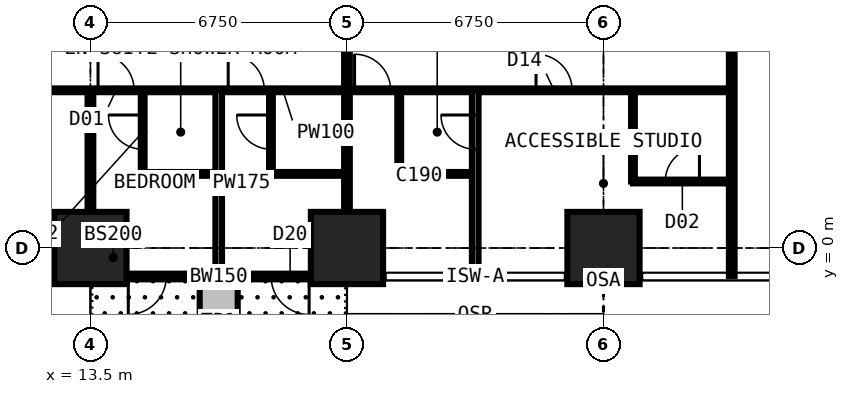
"""IFC4 building model, lengths in metres.
Left out: names, types, materials, properties, quantities, classifications, styles, units other than length and angle.
Written with IfcOpenShell. Run it as: python <this file> out.ifc"""

import sys

from ifc_helpers import new_model, si_unit, direction, frame, frame_2d, origin, origin_2d, place, context, subcontext, project, spatial, rectangle, extrude, element, fill, save


model = new_model("IFC4")
c1 = context("Model", 3, precision=1e-05, world=origin(), true_north=direction((0.0, 1.0)))
c2 = subcontext(c1, "Body", "Model", "MODEL_VIEW")
j1 = project(units=[si_unit("LENGTHUNIT", "METRE"), si_unit("PLANEANGLEUNIT", "RADIAN")], contexts=[c1])
p1 = place(None, origin())
s1 = spatial("IfcSite", under=j1, at=p1, CompositionType="ELEMENT")
p2 = place(p1, origin())
s2 = spatial("IfcBuilding", under=s1, at=p2, CompositionType="ELEMENT")
p3 = place(p2, frame((0.0, 0.0, 32.4)))
s3 = spatial("IfcBuildingStorey", under=s2, at=p3, CompositionType="ELEMENT", Elevation=32.4)
for number, where, z_axis, x_axis in (
    (1, (13.5, 0.0, 0.0), (0.0, 0.0, 1.0), (1.0, 0.0, 0.0)),
    (2, (20.25, 0.0, 0.0), (0.0, 0.0, 1.0), (1.0, 0.0, 0.0)),
    (3, (27.0, 0.0, 0.0), (0.0, 0.0, 1.0), (1.0, 0.0, 0.0)),
):
    element("IfcColumn", number, at=place(p3, frame(where, z_axis=z_axis, x_axis=x_axis)), inside=s3, PredefinedType="COLUMN", context=c2, shape_type="SweptSolid", body=[
        extrude(rectangle(XDim=1.9, YDim=1.9, at=origin_2d()), origin(), (0.0, 0.0, 1.0), 3.6),
    ])
p4 = place(p3, frame((20.25, -0.75, 0.0), z_axis=(0.0, 0.0, 1.0), x_axis=(-1.0, 0.0, 0.0)))
e4 = element("IfcWall", 4, at=p4, inside=s3, PredefinedType="SOLIDWALL", context=c2, shape_type="SweptSolid", body=[
    extrude(rectangle(XDim=6.75, YDim=0.15, at=frame_2d((3.375, 0.0))), origin(), (0.0, 0.0, 1.0), 3.375),
])
p5 = place(p4, frame((0.996, 0.0, 0.0)))
e5 = element("IfcOpeningElement", 5, at=p5, cuts=e4, PredefinedType="OPENING", context=c2, shape_type="SweptSolid", body=[
    extrude(rectangle(XDim=1.0, YDim=2.2, at=frame_2d((0.5, 1.1))), frame((0.0, 0.085, 0.0), z_axis=(0.0, -1.0, 0.0), x_axis=(1.0, 0.0, 0.0)), (0.0, 0.0, 1.0), 0.17),
])
p6 = place(p4, frame((2.042, 0.0, 0.9)))
e6 = element("IfcOpeningElement", 6, at=p6, cuts=e4, PredefinedType="OPENING", context=c2, shape_type="SweptSolid", body=[
    extrude(rectangle(XDim=1.2, YDim=1.8, at=frame_2d((0.6, 0.9))), frame((0.0, 0.085, 0.0), z_axis=(0.0, -1.0, 0.0), x_axis=(1.0, 0.0, 0.0)), (0.0, 0.0, 1.0), 0.17),
])
p7 = place(p4, frame((4.754, 0.0, 0.0)))
e7 = element("IfcOpeningElement", 7, at=p7, cuts=e4, PredefinedType="OPENING", context=c2, shape_type="SweptSolid", body=[
    extrude(rectangle(XDim=1.0, YDim=2.2, at=frame_2d((0.5, 1.1))), frame((0.0, 0.085, 0.0), z_axis=(0.0, -1.0, 0.0), x_axis=(1.0, 0.0, 0.0)), (0.0, 0.0, 1.0), 0.17),
])
p8 = place(p4, frame((3.508, 0.0, 0.9)))
e8 = element("IfcOpeningElement", 8, at=p8, cuts=e4, PredefinedType="OPENING", context=c2, shape_type="SweptSolid", body=[
    extrude(rectangle(XDim=1.2, YDim=1.8, at=frame_2d((0.6, 0.9))), frame((0.0, 0.085, 0.0), z_axis=(0.0, -1.0, 0.0), x_axis=(1.0, 0.0, 0.0)), (0.0, 0.0, 1.0), 0.17),
])
p9 = place(p3, frame((16.875, -0.85, 0.0), z_axis=(0.0, 0.0, 1.0), x_axis=(0.0, -1.0, 0.0)))
e9 = element("IfcWall", 9, at=p9, inside=s3, PredefinedType="USERDEFINED", context=c2, shape_type="SweptSolid", body=[
    extrude(rectangle(XDim=2.2, YDim=1.0, at=frame_2d((1.1, 0.0))), origin(), (0.0, 0.0, 1.0), 0.9),
])
p10 = place(p3, frame((6.75, 4.15, 0.0), z_axis=(0.0, 0.0, 1.0), x_axis=(1.0, 0.0, 0.0)))
e10 = element("IfcWall", 10, at=p10, inside=s3, PredefinedType="PARTITIONING", context=c2, shape_type="SweptSolid", body=[
    extrude(rectangle(XDim=23.625, YDim=0.1, at=frame_2d((11.812, 0.0))), origin(), (0.0, 0.0, 1.0), 3.375),
])
p11 = place(p10, frame((2.85, 0.0, 0.0)))
e11 = element("IfcOpeningElement", 11, at=p11, cuts=e10, PredefinedType="OPENING", context=c2, shape_type="SweptSolid", body=[
    extrude(rectangle(XDim=1.0, YDim=2.2, at=frame_2d((0.5, 1.1))), frame((0.0, 0.06, 0.0), z_axis=(0.0, -1.0, 0.0), x_axis=(1.0, 0.0, 0.0)), (0.0, 0.0, 1.0), 0.12),
])
p12 = place(p10, frame((6.95, 0.0, 0.0)))
e12 = element("IfcOpeningElement", 12, at=p12, cuts=e10, PredefinedType="OPENING", context=c2, shape_type="SweptSolid", body=[
    extrude(rectangle(XDim=0.95, YDim=2.2, at=frame_2d((0.475, 1.1))), frame((0.0, 0.06, 0.0), z_axis=(0.0, -1.0, 0.0), x_axis=(1.0, 0.0, 0.0)), (0.0, 0.0, 1.0), 0.12),
])
p13 = place(p10, frame((10.375, 0.0, 0.0)))
e13 = element("IfcOpeningElement", 13, at=p13, cuts=e10, PredefinedType="OPENING", context=c2, shape_type="SweptSolid", body=[
    extrude(rectangle(XDim=0.95, YDim=2.2, at=frame_2d((0.475, 1.1))), frame((0.0, 0.06, 0.0), z_axis=(0.0, -1.0, 0.0), x_axis=(1.0, 0.0, 0.0)), (0.0, 0.0, 1.0), 0.12),
])
p14 = place(p10, frame((18.475, 0.0, 0.0)))
e14 = element("IfcOpeningElement", 14, at=p14, cuts=e10, PredefinedType="OPENING", context=c2, shape_type="SweptSolid", body=[
    extrude(rectangle(XDim=0.95, YDim=2.2, at=frame_2d((0.475, 1.1))), frame((0.0, 0.06, 0.0), z_axis=(0.0, -1.0, 0.0), x_axis=(1.0, 0.0, 0.0)), (0.0, 0.0, 1.0), 0.12),
])
p15 = place(p10, frame((13.7, 0.0, 0.0)))
e15 = element("IfcOpeningElement", 15, at=p15, cuts=e10, PredefinedType="OPENING", context=c2, shape_type="SweptSolid", body=[
    extrude(rectangle(XDim=0.95, YDim=2.2, at=frame_2d((0.475, 1.1))), frame((0.0, 0.06, 0.0), z_axis=(0.0, -1.0, 0.0), x_axis=(1.0, 0.0, 0.0)), (0.0, 0.0, 1.0), 0.12),
])
p16 = place(p3, frame((13.5, -0.734, 0.0), z_axis=(0.0, 0.0, 1.0), x_axis=(0.0, 1.0, 0.0)))
e16 = element("IfcWall", 16, at=p16, inside=s3, PredefinedType="PARTITIONING", context=c2, shape_type="SweptSolid", body=[
    extrude(rectangle(XDim=4.884, YDim=0.15, at=frame_2d((2.442, 0.0))), origin(), (0.0, 0.0, 1.0), 2.877),
])
p17 = place(p3, frame((14.875, 1.95, 0.0), z_axis=(0.0, 0.0, 1.0), x_axis=(0.0, 1.0, 0.0)))
e17 = element("IfcWall", 17, at=p17, inside=s3, PredefinedType="PARTITIONING", context=c2, shape_type="SweptSolid", body=[
    extrude(rectangle(XDim=2.2, YDim=0.1, at=frame_2d((1.1, 0.0))), origin(), (0.0, 0.0, 1.0), 3.375),
])
p18 = place(p17, frame((0.65, 0.0, 0.0)))
e18 = element("IfcOpeningElement", 18, at=p18, cuts=e17, PredefinedType="OPENING", context=c2, shape_type="SweptSolid", body=[
    extrude(rectangle(XDim=0.9, YDim=2.2, at=frame_2d((0.45, 1.1))), frame((0.0, 0.06, 0.0), z_axis=(0.0, -1.0, 0.0), x_axis=(1.0, 0.0, 0.0)), (0.0, 0.0, 1.0), 0.12),
])
p19 = place(p3, frame((14.875, 1.95, 0.0), z_axis=(0.0, 0.0, 1.0), x_axis=(1.0, 0.0, 0.0)))
e19 = element("IfcWall", 19, at=p19, inside=s3, PredefinedType="PARTITIONING", context=c2, shape_type="SweptSolid", body=[
    extrude(rectangle(XDim=2.0, YDim=0.1, at=frame_2d((1.0, 0.0))), origin(), (0.0, 0.0, 1.0), 3.375),
])
p20 = place(p3, frame((16.875, -0.734, 0.0), z_axis=(0.0, 0.0, 1.0), x_axis=(0.0, 1.0, 0.0)))
e20 = element("IfcWall", 20, at=p20, inside=s3, PredefinedType="PARTITIONING", context=c2, shape_type="SweptSolid", body=[
    extrude(rectangle(XDim=4.884, YDim=0.175, at=frame_2d((2.442, 0.0))), origin(), (0.0, 0.0, 1.0), 3.375),
])
p21 = place(p3, frame((18.25, 1.95, 0.0), z_axis=(0.0, 0.0, 1.0), x_axis=(0.0, 1.0, 0.0)))
e21 = element("IfcWall", 21, at=p21, inside=s3, PredefinedType="PARTITIONING", context=c2, shape_type="SweptSolid", body=[
    extrude(rectangle(XDim=2.2, YDim=0.1, at=frame_2d((1.1, 0.0))), origin(), (0.0, 0.0, 1.0), 3.375),
])
p22 = place(p21, frame((0.65, 0.0, 0.0)))
e22 = element("IfcOpeningElement", 22, at=p22, cuts=e21, PredefinedType="OPENING", context=c2, shape_type="SweptSolid", body=[
    extrude(rectangle(XDim=0.9, YDim=2.2, at=frame_2d((0.45, 1.1))), frame((0.0, 0.06, 0.0), z_axis=(0.0, -1.0, 0.0), x_axis=(1.0, 0.0, 0.0)), (0.0, 0.0, 1.0), 0.12),
])
p23 = place(p3, frame((18.25, 1.95, 0.0), z_axis=(0.0, 0.0, 1.0), x_axis=(1.0, 0.0, 0.0)))
e23 = element("IfcWall", 23, at=p23, inside=s3, PredefinedType="PARTITIONING", context=c2, shape_type="SweptSolid", body=[
    extrude(rectangle(XDim=2.0, YDim=0.1, at=frame_2d((1.0, 0.0))), origin(), (0.0, 0.0, 1.0), 3.375),
])
p24 = place(p3, frame((20.25, -0.734, 0.0), z_axis=(0.0, 0.0, 1.0), x_axis=(0.0, 1.0, 0.0)))
e24 = element("IfcWall", 24, at=p24, inside=s3, PredefinedType="PARTITIONING", context=c2, shape_type="SweptSolid", body=[
    extrude(rectangle(XDim=12.034, YDim=0.15, at=frame_2d((6.017, 0.0))), origin(), (0.0, 0.0, 1.0), 2.61),
])
p25 = place(p3, frame((21.625, 1.95, 0.0), z_axis=(0.0, 0.0, 1.0), x_axis=(0.0, 1.0, 0.0)))
e25 = element("IfcWall", 25, at=p25, inside=s3, PredefinedType="PARTITIONING", context=c2, shape_type="SweptSolid", body=[
    extrude(rectangle(XDim=2.2, YDim=0.1, at=frame_2d((1.1, 0.0))), origin(), (0.0, 0.0, 1.0), 3.375),
])
p26 = place(p3, frame((21.625, 1.95, 0.0), z_axis=(0.0, 0.0, 1.0), x_axis=(1.0, 0.0, 0.0)))
e26 = element("IfcWall", 26, at=p26, inside=s3, PredefinedType="PARTITIONING", context=c2, shape_type="SweptSolid", body=[
    extrude(rectangle(XDim=2.0, YDim=0.1, at=frame_2d((1.0, 0.0))), origin(), (0.0, 0.0, 1.0), 3.375),
])
p27 = place(p3, frame((23.625, -0.734, 0.0), z_axis=(0.0, 0.0, 1.0), x_axis=(0.0, 1.0, 0.0)))
e27 = element("IfcWall", 27, at=p27, inside=s3, PredefinedType="PARTITIONING", context=c2, shape_type="SweptSolid", body=[
    extrude(rectangle(XDim=4.884, YDim=0.175, at=frame_2d((2.442, 0.0))), origin(), (0.0, 0.0, 1.0), 3.375),
])
p28 = place(p27, frame((3.334, 0.0, 0.0)))
e28 = element("IfcOpeningElement", 28, at=p28, cuts=e27, PredefinedType="OPENING", context=c2, shape_type="SweptSolid", body=[
    extrude(rectangle(XDim=0.9, YDim=2.2, at=frame_2d((0.45, 1.1))), frame((0.0, 0.097, 0.0), z_axis=(0.0, -1.0, 0.0), x_axis=(1.0, 0.0, 0.0)), (0.0, 0.0, 1.0), 0.195),
])
p29 = place(p3, frame((27.775, 1.75, 0.0), z_axis=(0.0, 0.0, 1.0), x_axis=(0.0, 1.0, 0.0)))
e29 = element("IfcWall", 29, at=p29, inside=s3, PredefinedType="PARTITIONING", context=c2, shape_type="SweptSolid", body=[
    extrude(rectangle(XDim=2.4, YDim=0.1, at=frame_2d((1.2, 0.0))), origin(), (0.0, 0.0, 1.0), 3.375),
])
p30 = place(p3, frame((27.775, 1.75, 0.0), z_axis=(0.0, 0.0, 1.0), x_axis=(1.0, 0.0, 0.0)))
e30 = element("IfcWall", 30, at=p30, inside=s3, PredefinedType="PARTITIONING", context=c2, shape_type="SweptSolid", body=[
    extrude(rectangle(XDim=2.6, YDim=0.1, at=frame_2d((1.3, 0.0))), origin(), (0.0, 0.0, 1.0), 3.375),
])
p31 = place(p30, frame((0.85, 0.0, 0.0)))
e31 = element("IfcOpeningElement", 31, at=p31, cuts=e30, PredefinedType="OPENING", context=c2, shape_type="SweptSolid", body=[
    extrude(rectangle(XDim=0.9, YDim=2.2, at=frame_2d((0.45, 1.1))), frame((0.0, 0.06, 0.0), z_axis=(0.0, -1.0, 0.0), x_axis=(1.0, 0.0, 0.0)), (0.0, 0.0, 1.0), 0.12),
])
p32 = place(p3, frame((30.375, -0.734, 0.0), z_axis=(0.0, 0.0, 1.0), x_axis=(0.0, 1.0, 0.0)))
e32 = element("IfcWall", 32, at=p32, inside=s3, PredefinedType="PARTITIONING", context=c2, shape_type="SweptSolid", body=[
    extrude(rectangle(XDim=12.034, YDim=0.15, at=frame_2d((6.017, 0.0))), origin(), (0.0, 0.0, 1.0), 3.375),
])
p33 = place(p5, origin())
e33 = element("IfcDoor", 33, at=p33, inside=s3, OperationType="SINGLE_SWING_LEFT", PredefinedType="DOOR", context=c2, shape_type="SweptSolid", body=[
    extrude(rectangle(XDim=1.0, YDim=2.2, at=frame_2d((0.5, 1.1))), frame((0.0, 0.025, 0.0), z_axis=(0.0, -1.0, 0.0), x_axis=(1.0, 0.0, 0.0)), (0.0, 0.0, 1.0), 0.05),
])
fill(e5, e33)
p34 = place(p6, origin())
e34 = element("IfcWindow", 34, at=p34, inside=s3, PartitioningType="SINGLE_PANEL", PredefinedType="WINDOW", context=c2, shape_type="SweptSolid", body=[
    extrude(rectangle(XDim=1.2, YDim=1.8, at=frame_2d((0.6, 0.9))), frame((0.0, 0.03, 0.0), z_axis=(0.0, -1.0, 0.0), x_axis=(1.0, 0.0, 0.0)), (0.0, 0.0, 1.0), 0.06),
])
fill(e6, e34)
p35 = place(p7, origin())
e35 = element("IfcDoor", 35, at=p35, inside=s3, OperationType="SINGLE_SWING_RIGHT", PredefinedType="DOOR", context=c2, shape_type="SweptSolid", body=[
    extrude(rectangle(XDim=1.0, YDim=2.2, at=frame_2d((0.5, 1.1))), frame((0.0, 0.025, 0.0), z_axis=(0.0, -1.0, 0.0), x_axis=(1.0, 0.0, 0.0)), (0.0, 0.0, 1.0), 0.05),
])
fill(e7, e35)
p36 = place(p8, origin())
e36 = element("IfcWindow", 36, at=p36, inside=s3, PartitioningType="SINGLE_PANEL", PredefinedType="WINDOW", context=c2, shape_type="SweptSolid", body=[
    extrude(rectangle(XDim=1.2, YDim=1.8, at=frame_2d((0.6, 0.9))), frame((0.0, 0.03, 0.0), z_axis=(0.0, -1.0, 0.0), x_axis=(1.0, 0.0, 0.0)), (0.0, 0.0, 1.0), 0.06),
])
fill(e8, e36)
p37 = place(p12, origin())
e37 = element("IfcDoor", 37, at=p37, inside=s3, OperationType="SINGLE_SWING_LEFT", PredefinedType="DOOR", context=c2, shape_type="SweptSolid", body=[
    extrude(rectangle(XDim=0.95, YDim=2.2, at=frame_2d((0.475, 1.1))), frame((0.0, 0.025, 0.0), z_axis=(0.0, -1.0, 0.0), x_axis=(1.0, 0.0, 0.0)), (0.0, 0.0, 1.0), 0.05),
])
fill(e12, e37)
p38 = place(p18, origin())
e38 = element("IfcDoor", 38, at=p38, inside=s3, OperationType="SINGLE_SWING_RIGHT", PredefinedType="DOOR", context=c2, shape_type="SweptSolid", body=[
    extrude(rectangle(XDim=0.9, YDim=2.2, at=frame_2d((0.45, 1.1))), frame((0.0, 0.025, 0.0), z_axis=(0.0, -1.0, 0.0), x_axis=(1.0, 0.0, 0.0)), (0.0, 0.0, 1.0), 0.05),
])
fill(e18, e38)
p39 = place(p13, origin())
e39 = element("IfcDoor", 39, at=p39, inside=s3, OperationType="SINGLE_SWING_LEFT", PredefinedType="DOOR", context=c2, shape_type="SweptSolid", body=[
    extrude(rectangle(XDim=0.95, YDim=2.2, at=frame_2d((0.475, 1.1))), frame((0.0, 0.025, 0.0), z_axis=(0.0, -1.0, 0.0), x_axis=(1.0, 0.0, 0.0)), (0.0, 0.0, 1.0), 0.05),
])
fill(e13, e39)
p40 = place(p22, origin())
e40 = element("IfcDoor", 40, at=p40, inside=s3, OperationType="SINGLE_SWING_RIGHT", PredefinedType="DOOR", context=c2, shape_type="SweptSolid", body=[
    extrude(rectangle(XDim=0.9, YDim=2.2, at=frame_2d((0.45, 1.1))), frame((0.0, 0.025, 0.0), z_axis=(0.0, -1.0, 0.0), x_axis=(1.0, 0.0, 0.0)), (0.0, 0.0, 1.0), 0.05),
])
fill(e22, e40)
p41 = place(p14, origin())
e41 = element("IfcDoor", 41, at=p41, inside=s3, OperationType="SINGLE_SWING_LEFT", PredefinedType="DOOR", context=c2, shape_type="SweptSolid", body=[
    extrude(rectangle(XDim=0.95, YDim=2.2, at=frame_2d((0.475, 1.1))), frame((0.0, 0.025, 0.0), z_axis=(0.0, -1.0, 0.0), x_axis=(1.0, 0.0, 0.0)), (0.0, 0.0, 1.0), 0.05),
])
fill(e14, e41)
p42 = place(p31, origin())
e42 = element("IfcDoor", 42, at=p42, inside=s3, OperationType="SINGLE_SWING_RIGHT", PredefinedType="DOOR", context=c2, shape_type="SweptSolid", body=[
    extrude(rectangle(XDim=0.9, YDim=2.2, at=frame_2d((0.45, 1.1))), frame((0.0, 0.025, 0.0), z_axis=(0.0, -1.0, 0.0), x_axis=(1.0, 0.0, 0.0)), (0.0, 0.0, 1.0), 0.05),
])
fill(e31, e42)
p43 = place(p15, origin())
e43 = element("IfcDoor", 43, at=p43, inside=s3, OperationType="SINGLE_SWING_LEFT", PredefinedType="DOOR", context=c2, shape_type="SweptSolid", body=[
    extrude(rectangle(XDim=0.95, YDim=2.2, at=frame_2d((0.475, 1.1))), frame((0.0, 0.025, 0.0), z_axis=(0.0, -1.0, 0.0), x_axis=(1.0, 0.0, 0.0)), (0.0, 0.0, 1.0), 0.05),
])
fill(e15, e43)
p44 = place(p28, origin())
e44 = element("IfcDoor", 44, at=p44, inside=s3, OperationType="SINGLE_SWING_RIGHT", PredefinedType="DOOR", context=c2, shape_type="SweptSolid", body=[
    extrude(rectangle(XDim=0.9, YDim=2.2, at=frame_2d((0.45, 1.1))), frame((0.0, 0.025, 0.0), z_axis=(0.0, -1.0, 0.0), x_axis=(1.0, 0.0, 0.0)), (0.0, 0.0, 1.0), 0.05),
])
fill(e28, e44)
save(model, sys.argv[1])
